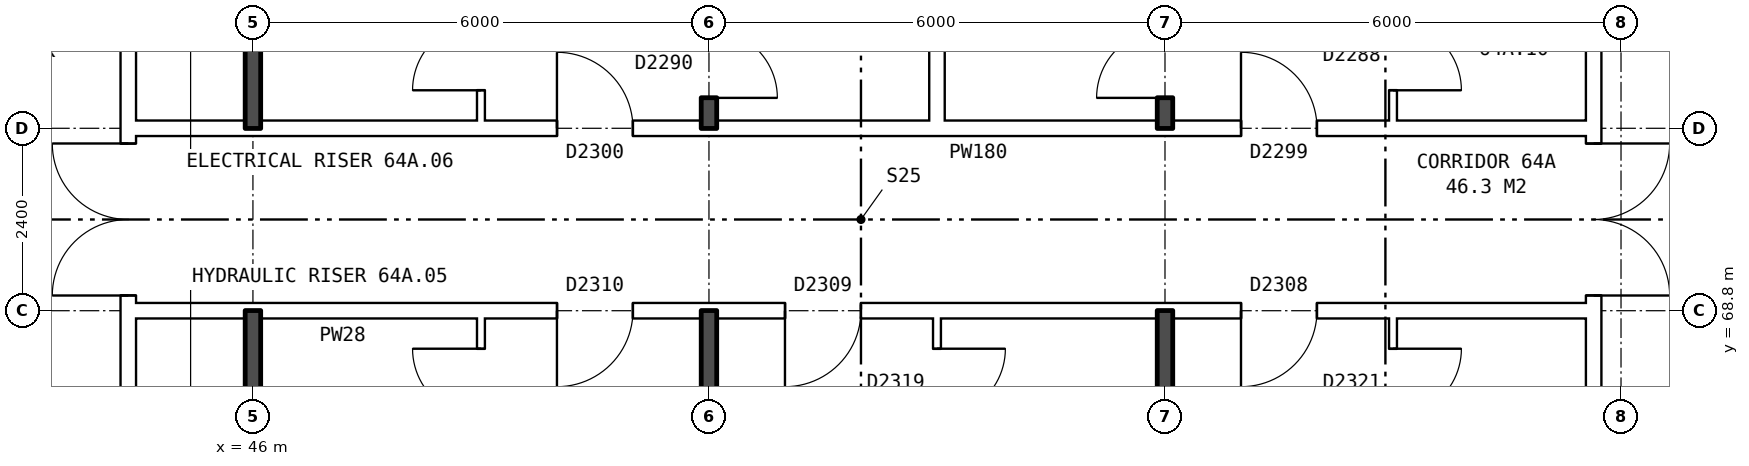
"""IFC4 building model, lengths in metres.
Left out: names, types, materials, properties, quantities, classifications, styles, units other than length and angle.
Written with IfcOpenShell. Run it as: python <this file> out.ifc"""

import sys

from ifc_helpers import new_model, si_unit, direction, frame, frame_2d, origin, place, context, subcontext, project, spatial, rectangle, extrude, element, fill, save


model = new_model("IFC4")
c1 = context("Model", 3, precision=1e-05, world=origin(), true_north=direction((0.0, 1.0)))
c2 = subcontext(c1, "Body", "Model", "MODEL_VIEW")
j1 = project(units=[si_unit("LENGTHUNIT", "METRE"), si_unit("PLANEANGLEUNIT", "RADIAN")], contexts=[c1])
p1 = place(None, origin())
s1 = spatial("IfcSite", under=j1, at=p1, CompositionType="ELEMENT")
p2 = place(p1, origin())
s2 = spatial("IfcBuilding", under=s1, at=p2, CompositionType="ELEMENT")
p3 = place(p2, frame((0.0, 0.0, 227.6)))
s3 = spatial("IfcBuildingStorey", under=s2, at=p3, CompositionType="ELEMENT", Elevation=227.6)
p4 = place(p3, frame((63.64, 63.9, 0.0), z_axis=(0.0, 0.0, 1.0), x_axis=(0.0, 1.0, 0.0)))
e1 = element("IfcWall", 1, at=p4, inside=s3, PredefinedType="PARTITIONING", context=c2, shape_type="SweptSolid", body=[
    extrude(rectangle(XDim=12.2, YDim=0.2, at=frame_2d((6.1, 0.0))), origin(), (0.0, 0.0, 1.0), 2.85),
])
p5 = place(p4, frame((5.1, 0.0, 0.0)))
e2 = element("IfcOpeningElement", 2, at=p5, cuts=e1, PredefinedType="OPENING", context=c2, shape_type="SweptSolid", body=[
    extrude(rectangle(XDim=2.0, YDim=2.1, at=frame_2d((1.0, 1.05))), frame((0.0, 0.11, 0.0), z_axis=(0.0, -1.0, 0.0), x_axis=(1.0, 0.0, 0.0)), (0.0, 0.0, 1.0), 0.22),
])
p6 = place(p3, frame((44.36, 63.9, 0.0), z_axis=(0.0, 0.0, 1.0), x_axis=(0.0, 1.0, 0.0)))
e3 = element("IfcWall", 3, at=p6, inside=s3, PredefinedType="PARTITIONING", context=c2, shape_type="SweptSolid", body=[
    extrude(rectangle(XDim=12.2, YDim=0.2, at=frame_2d((6.1, 0.0))), origin(), (0.0, 0.0, 1.0), 2.85),
])
p7 = place(p6, frame((5.1, 0.0, 0.0)))
e4 = element("IfcOpeningElement", 4, at=p7, cuts=e3, PredefinedType="OPENING", context=c2, shape_type="SweptSolid", body=[
    extrude(rectangle(XDim=2.0, YDim=2.1, at=frame_2d((1.0, 1.05))), frame((0.0, 0.11, 0.0), z_axis=(0.0, -1.0, 0.0), x_axis=(1.0, 0.0, 0.0)), (0.0, 0.0, 1.0), 0.22),
])
p8 = place(p3, frame((44.36, 68.8, 0.0), z_axis=(0.0, 0.0, 1.0), x_axis=(1.0, 0.0, 0.0)))
e5 = element("IfcWall", 5, at=p8, inside=s3, PredefinedType="PARTITIONING", context=c2, shape_type="SweptSolid", body=[
    extrude(rectangle(XDim=19.28, YDim=0.2, at=frame_2d((9.64, 0.0))), origin(), (0.0, 0.0, 1.0), 2.85),
])
p9 = place(p8, frame((14.64, 0.0, 0.0)))
e6 = element("IfcOpeningElement", 6, at=p9, cuts=e5, PredefinedType="OPENING", context=c2, shape_type="SweptSolid", body=[
    extrude(rectangle(XDim=1.0, YDim=2.1, at=frame_2d((0.5, 1.05))), frame((0.0, 0.11, 0.0), z_axis=(0.0, -1.0, 0.0), x_axis=(1.0, 0.0, 0.0)), (0.0, 0.0, 1.0), 0.22),
])
p10 = place(p8, frame((8.64, 0.0, 0.0)))
e7 = element("IfcOpeningElement", 7, at=p10, cuts=e5, PredefinedType="OPENING", context=c2, shape_type="SweptSolid", body=[
    extrude(rectangle(XDim=1.0, YDim=2.1, at=frame_2d((0.5, 1.05))), frame((0.0, 0.11, 0.0), z_axis=(0.0, -1.0, 0.0), x_axis=(1.0, 0.0, 0.0)), (0.0, 0.0, 1.0), 0.22),
])
p11 = place(p8, frame((5.64, 0.0, 0.0)))
e8 = element("IfcOpeningElement", 8, at=p11, cuts=e5, PredefinedType="OPENING", context=c2, shape_type="SweptSolid", body=[
    extrude(rectangle(XDim=1.0, YDim=2.1, at=frame_2d((0.5, 1.05))), frame((0.0, 0.11, 0.0), z_axis=(0.0, -1.0, 0.0), x_axis=(1.0, 0.0, 0.0)), (0.0, 0.0, 1.0), 0.22),
])
p12 = place(p3, frame((44.36, 71.2, 0.0), z_axis=(0.0, 0.0, 1.0), x_axis=(1.0, 0.0, 0.0)))
e9 = element("IfcWall", 9, at=p12, inside=s3, PredefinedType="PARTITIONING", context=c2, shape_type="SweptSolid", body=[
    extrude(rectangle(XDim=19.28, YDim=0.2, at=frame_2d((9.64, 0.0))), origin(), (0.0, 0.0, 1.0), 2.85),
])
p13 = place(p12, frame((14.64, 0.0, 0.0)))
e10 = element("IfcOpeningElement", 10, at=p13, cuts=e9, PredefinedType="OPENING", context=c2, shape_type="SweptSolid", body=[
    extrude(rectangle(XDim=1.0, YDim=2.1, at=frame_2d((0.5, 1.05))), frame((0.0, 0.11, 0.0), z_axis=(0.0, -1.0, 0.0), x_axis=(1.0, 0.0, 0.0)), (0.0, 0.0, 1.0), 0.22),
])
p14 = place(p12, frame((5.64, 0.0, 0.0)))
e11 = element("IfcOpeningElement", 11, at=p14, cuts=e9, PredefinedType="OPENING", context=c2, shape_type="SweptSolid", body=[
    extrude(rectangle(XDim=1.0, YDim=2.1, at=frame_2d((0.5, 1.05))), frame((0.0, 0.11, 0.0), z_axis=(0.0, -1.0, 0.0), x_axis=(1.0, 0.0, 0.0)), (0.0, 0.0, 1.0), 0.22),
])
for number, where, z_axis, x_axis in (
    (12, (46.0, 54.36, 0.0), (0.0, 0.0, 1.0), (0.0, 1.0, 0.0)),
    (13, (46.0, 71.2, 0.0), (0.0, 0.0, 1.0), (0.0, 1.0, 0.0)),
):
    element("IfcWall", number, at=place(p3, frame(where, z_axis=z_axis, x_axis=x_axis)), inside=s3, PredefinedType="SOLIDWALL", context=c2, shape_type="SweptSolid", body=[
        extrude(rectangle(XDim=14.44, YDim=0.2, at=frame_2d((7.22, 0.0))), origin(), (0.0, 0.0, 1.0), 2.85),
    ])
p15 = place(p3, frame((49.0, 54.36, 0.0), z_axis=(0.0, 0.0, 1.0), x_axis=(0.0, 1.0, 0.0)))
e14 = element("IfcWall", 14, at=p15, inside=s3, PredefinedType="PARTITIONING", context=c2, shape_type="SweptSolid", body=[
    extrude(rectangle(XDim=14.34, YDim=0.1, at=frame_2d((7.17, 0.0))), origin(), (0.0, 0.0, 1.0), 2.85),
])
p16 = place(p15, frame((7.7, 0.0, 0.0)))
e15 = element("IfcOpeningElement", 15, at=p16, cuts=e14, PredefinedType="OPENING", context=c2, shape_type="SweptSolid", body=[
    extrude(rectangle(XDim=0.9, YDim=2.1, at=frame_2d((0.45, 1.05))), frame((0.0, 0.06, 0.0), z_axis=(0.0, -1.0, 0.0), x_axis=(1.0, 0.0, 0.0)), (0.0, 0.0, 1.0), 0.12),
])
p17 = place(p15, frame((13.04, 0.0, 0.0)))
e16 = element("IfcOpeningElement", 16, at=p17, cuts=e14, PredefinedType="OPENING", context=c2, shape_type="SweptSolid", body=[
    extrude(rectangle(XDim=0.9, YDim=2.1, at=frame_2d((0.45, 1.05))), frame((0.0, 0.06, 0.0), z_axis=(0.0, -1.0, 0.0), x_axis=(1.0, 0.0, 0.0)), (0.0, 0.0, 1.0), 0.12),
])
p18 = place(p3, frame((49.0, 71.3, 0.0), z_axis=(0.0, 0.0, 1.0), x_axis=(0.0, 1.0, 0.0)))
e17 = element("IfcWall", 17, at=p18, inside=s3, PredefinedType="PARTITIONING", context=c2, shape_type="SweptSolid", body=[
    extrude(rectangle(XDim=14.34, YDim=0.1, at=frame_2d((7.17, 0.0))), origin(), (0.0, 0.0, 1.0), 2.85),
])
p19 = place(p18, frame((5.74, 0.0, 0.0)))
e18 = element("IfcOpeningElement", 18, at=p19, cuts=e17, PredefinedType="OPENING", context=c2, shape_type="SweptSolid", body=[
    extrude(rectangle(XDim=0.9, YDim=2.1, at=frame_2d((0.45, 1.05))), frame((0.0, 0.06, 0.0), z_axis=(0.0, -1.0, 0.0), x_axis=(1.0, 0.0, 0.0)), (0.0, 0.0, 1.0), 0.12),
])
p20 = place(p18, frame((0.4, 0.0, 0.0)))
e19 = element("IfcOpeningElement", 19, at=p20, cuts=e17, PredefinedType="OPENING", context=c2, shape_type="SweptSolid", body=[
    extrude(rectangle(XDim=0.9, YDim=2.1, at=frame_2d((0.45, 1.05))), frame((0.0, 0.06, 0.0), z_axis=(0.0, -1.0, 0.0), x_axis=(1.0, 0.0, 0.0)), (0.0, 0.0, 1.0), 0.12),
])
p21 = place(p3, frame((52.0, 54.36, 0.0), z_axis=(0.0, 0.0, 1.0), x_axis=(0.0, 1.0, 0.0)))
e20 = element("IfcWall", 20, at=p21, inside=s3, PredefinedType="SOLIDWALL", context=c2, shape_type="SweptSolid", body=[
    extrude(rectangle(XDim=14.44, YDim=0.2, at=frame_2d((7.22, 0.0))), origin(), (0.0, 0.0, 1.0), 2.85),
])
p22 = place(p3, frame((52.0, 71.2, 0.0), z_axis=(0.0, 0.0, 1.0), x_axis=(0.0, 1.0, 0.0)))
e21 = element("IfcWall", 21, at=p22, inside=s3, PredefinedType="SOLIDWALL", context=c2, shape_type="SweptSolid", body=[
    extrude(rectangle(XDim=14.44, YDim=0.2, at=frame_2d((7.22, 0.0))), origin(), (0.0, 0.0, 1.0), 2.85),
])
p23 = place(p22, frame((5.84, 0.0, 0.0)))
e22 = element("IfcOpeningElement", 22, at=p23, cuts=e21, PredefinedType="OPENING", context=c2, shape_type="SweptSolid", body=[
    extrude(rectangle(XDim=0.9, YDim=2.1, at=frame_2d((0.45, 1.05))), frame((0.0, 0.11, 0.0), z_axis=(0.0, -1.0, 0.0), x_axis=(1.0, 0.0, 0.0)), (0.0, 0.0, 1.0), 0.22),
])
p24 = place(p22, frame((0.4, 0.0, 0.0)))
e23 = element("IfcOpeningElement", 23, at=p24, cuts=e21, PredefinedType="OPENING", context=c2, shape_type="SweptSolid", body=[
    extrude(rectangle(XDim=0.9, YDim=2.1, at=frame_2d((0.45, 1.05))), frame((0.0, 0.11, 0.0), z_axis=(0.0, -1.0, 0.0), x_axis=(1.0, 0.0, 0.0)), (0.0, 0.0, 1.0), 0.22),
])
p25 = place(p3, frame((55.0, 54.36, 0.0), z_axis=(0.0, 0.0, 1.0), x_axis=(0.0, 1.0, 0.0)))
e24 = element("IfcWall", 24, at=p25, inside=s3, PredefinedType="PARTITIONING", context=c2, shape_type="SweptSolid", body=[
    extrude(rectangle(XDim=14.34, YDim=0.1, at=frame_2d((7.17, 0.0))), origin(), (0.0, 0.0, 1.0), 2.85),
])
p26 = place(p25, frame((4.2, 0.0, 0.0)))
e25 = element("IfcOpeningElement", 25, at=p26, cuts=e24, PredefinedType="OPENING", context=c2, shape_type="SweptSolid", body=[
    extrude(rectangle(XDim=0.9, YDim=2.1, at=frame_2d((0.45, 1.05))), frame((0.0, 0.06, 0.0), z_axis=(0.0, -1.0, 0.0), x_axis=(1.0, 0.0, 0.0)), (0.0, 0.0, 1.0), 0.12),
])
p27 = place(p25, frame((13.04, 0.0, 0.0)))
e26 = element("IfcOpeningElement", 26, at=p27, cuts=e24, PredefinedType="OPENING", context=c2, shape_type="SweptSolid", body=[
    extrude(rectangle(XDim=0.9, YDim=2.1, at=frame_2d((0.45, 1.05))), frame((0.0, 0.06, 0.0), z_axis=(0.0, -1.0, 0.0), x_axis=(1.0, 0.0, 0.0)), (0.0, 0.0, 1.0), 0.12),
])
p28 = place(p3, frame((55.0, 71.3, 0.0), z_axis=(0.0, 0.0, 1.0), x_axis=(0.0, 1.0, 0.0)))
e27 = element("IfcWall", 27, at=p28, inside=s3, PredefinedType="PARTITIONING", context=c2, shape_type="SweptSolid", body=[
    extrude(rectangle(XDim=14.34, YDim=0.2, at=frame_2d((7.17, 0.0))), origin(), (0.0, 0.0, 1.0), 2.85),
])
p29 = place(p3, frame((58.0, 54.36, 0.0), z_axis=(0.0, 0.0, 1.0), x_axis=(0.0, 1.0, 0.0)))
e28 = element("IfcWall", 28, at=p29, inside=s3, PredefinedType="SOLIDWALL", context=c2, shape_type="SweptSolid", body=[
    extrude(rectangle(XDim=14.44, YDim=0.2, at=frame_2d((7.22, 0.0))), origin(), (0.0, 0.0, 1.0), 2.85),
])
p30 = place(p3, frame((58.0, 71.2, 0.0), z_axis=(0.0, 0.0, 1.0), x_axis=(0.0, 1.0, 0.0)))
e29 = element("IfcWall", 29, at=p30, inside=s3, PredefinedType="SOLIDWALL", context=c2, shape_type="SweptSolid", body=[
    extrude(rectangle(XDim=14.44, YDim=0.2, at=frame_2d((7.22, 0.0))), origin(), (0.0, 0.0, 1.0), 2.85),
])
p31 = place(p30, frame((8.04, 0.0, 0.0)))
e30 = element("IfcOpeningElement", 30, at=p31, cuts=e29, PredefinedType="OPENING", context=c2, shape_type="SweptSolid", body=[
    extrude(rectangle(XDim=0.9, YDim=2.1, at=frame_2d((0.45, 1.05))), frame((0.0, 0.11, 0.0), z_axis=(0.0, -1.0, 0.0), x_axis=(1.0, 0.0, 0.0)), (0.0, 0.0, 1.0), 0.22),
])
p32 = place(p30, frame((0.4, 0.0, 0.0)))
e31 = element("IfcOpeningElement", 31, at=p32, cuts=e29, PredefinedType="OPENING", context=c2, shape_type="SweptSolid", body=[
    extrude(rectangle(XDim=0.9, YDim=2.1, at=frame_2d((0.45, 1.05))), frame((0.0, 0.11, 0.0), z_axis=(0.0, -1.0, 0.0), x_axis=(1.0, 0.0, 0.0)), (0.0, 0.0, 1.0), 0.22),
])
p33 = place(p3, frame((61.0, 54.36, 0.0), z_axis=(0.0, 0.0, 1.0), x_axis=(0.0, 1.0, 0.0)))
e32 = element("IfcWall", 32, at=p33, inside=s3, PredefinedType="PARTITIONING", context=c2, shape_type="SweptSolid", body=[
    extrude(rectangle(XDim=14.34, YDim=0.1, at=frame_2d((7.17, 0.0))), origin(), (0.0, 0.0, 1.0), 2.85),
])
p34 = place(p33, frame((7.7, 0.0, 0.0)))
e33 = element("IfcOpeningElement", 33, at=p34, cuts=e32, PredefinedType="OPENING", context=c2, shape_type="SweptSolid", body=[
    extrude(rectangle(XDim=0.9, YDim=2.1, at=frame_2d((0.45, 1.05))), frame((0.0, 0.06, 0.0), z_axis=(0.0, -1.0, 0.0), x_axis=(1.0, 0.0, 0.0)), (0.0, 0.0, 1.0), 0.12),
])
p35 = place(p33, frame((13.04, 0.0, 0.0)))
e34 = element("IfcOpeningElement", 34, at=p35, cuts=e32, PredefinedType="OPENING", context=c2, shape_type="SweptSolid", body=[
    extrude(rectangle(XDim=0.9, YDim=2.1, at=frame_2d((0.45, 1.05))), frame((0.0, 0.06, 0.0), z_axis=(0.0, -1.0, 0.0), x_axis=(1.0, 0.0, 0.0)), (0.0, 0.0, 1.0), 0.12),
])
p36 = place(p3, frame((61.0, 71.3, 0.0), z_axis=(0.0, 0.0, 1.0), x_axis=(0.0, 1.0, 0.0)))
e35 = element("IfcWall", 35, at=p36, inside=s3, PredefinedType="PARTITIONING", context=c2, shape_type="SweptSolid", body=[
    extrude(rectangle(XDim=14.34, YDim=0.1, at=frame_2d((7.17, 0.0))), origin(), (0.0, 0.0, 1.0), 2.85),
])
p37 = place(p36, frame((7.94, 0.0, 0.0)))
e36 = element("IfcOpeningElement", 36, at=p37, cuts=e35, PredefinedType="OPENING", context=c2, shape_type="SweptSolid", body=[
    extrude(rectangle(XDim=0.9, YDim=2.1, at=frame_2d((0.45, 1.05))), frame((0.0, 0.06, 0.0), z_axis=(0.0, -1.0, 0.0), x_axis=(1.0, 0.0, 0.0)), (0.0, 0.0, 1.0), 0.12),
])
p38 = place(p36, frame((0.4, 0.0, 0.0)))
e37 = element("IfcOpeningElement", 37, at=p38, cuts=e35, PredefinedType="OPENING", context=c2, shape_type="SweptSolid", body=[
    extrude(rectangle(XDim=0.9, YDim=2.1, at=frame_2d((0.45, 1.05))), frame((0.0, 0.06, 0.0), z_axis=(0.0, -1.0, 0.0), x_axis=(1.0, 0.0, 0.0)), (0.0, 0.0, 1.0), 0.12),
])
p39 = place(p5, frame((2.0, 0.0, 0.0), z_axis=(0.0, 0.0, 1.0), x_axis=(-1.0, 0.0, 0.0)))
e38 = element("IfcDoor", 38, at=p39, inside=s3, OperationType="DOUBLE_DOOR_SINGLE_SWING", PredefinedType="DOOR", context=c2, shape_type="SweptSolid", body=[
    extrude(rectangle(XDim=2.0, YDim=2.1, at=frame_2d((1.0, 1.05))), frame((0.0, 0.025, 0.0), z_axis=(0.0, -1.0, 0.0), x_axis=(1.0, 0.0, 0.0)), (0.0, 0.0, 1.0), 0.05),
])
fill(e2, e38)
p40 = place(p7, origin())
e39 = element("IfcDoor", 39, at=p40, inside=s3, OperationType="DOUBLE_DOOR_SINGLE_SWING", PredefinedType="DOOR", context=c2, shape_type="SweptSolid", body=[
    extrude(rectangle(XDim=2.0, YDim=2.1, at=frame_2d((1.0, 1.05))), frame((0.0, 0.025, 0.0), z_axis=(0.0, -1.0, 0.0), x_axis=(1.0, 0.0, 0.0)), (0.0, 0.0, 1.0), 0.05),
])
fill(e4, e39)
p41 = place(p9, frame((1.0, 0.0, 0.0), z_axis=(0.0, 0.0, 1.0), x_axis=(-1.0, 0.0, 0.0)))
e40 = element("IfcDoor", 40, at=p41, inside=s3, OperationType="SINGLE_SWING_RIGHT", PredefinedType="DOOR", context=c2, shape_type="SweptSolid", body=[
    extrude(rectangle(XDim=1.0, YDim=2.1, at=frame_2d((0.5, 1.05))), frame((0.0, 0.025, 0.0), z_axis=(0.0, -1.0, 0.0), x_axis=(1.0, 0.0, 0.0)), (0.0, 0.0, 1.0), 0.05),
])
fill(e6, e40)
p42 = place(p35, frame((0.9, 0.0, 0.0), z_axis=(0.0, 0.0, 1.0), x_axis=(-1.0, 0.0, 0.0)))
e41 = element("IfcDoor", 41, at=p42, inside=s3, OperationType="SINGLE_SWING_LEFT", PredefinedType="DOOR", context=c2, shape_type="SweptSolid", body=[
    extrude(rectangle(XDim=0.9, YDim=2.1, at=frame_2d((0.45, 1.05))), frame((0.0, 0.025, 0.0), z_axis=(0.0, -1.0, 0.0), x_axis=(1.0, 0.0, 0.0)), (0.0, 0.0, 1.0), 0.05),
])
fill(e34, e41)
p43 = place(p10, frame((1.0, 0.0, 0.0), z_axis=(0.0, 0.0, 1.0), x_axis=(-1.0, 0.0, 0.0)))
e42 = element("IfcDoor", 42, at=p43, inside=s3, OperationType="SINGLE_SWING_RIGHT", PredefinedType="DOOR", context=c2, shape_type="SweptSolid", body=[
    extrude(rectangle(XDim=1.0, YDim=2.1, at=frame_2d((0.5, 1.05))), frame((0.0, 0.025, 0.0), z_axis=(0.0, -1.0, 0.0), x_axis=(1.0, 0.0, 0.0)), (0.0, 0.0, 1.0), 0.05),
])
fill(e7, e42)
p44 = place(p27, frame((0.9, 0.0, 0.0), z_axis=(0.0, 0.0, 1.0), x_axis=(-1.0, 0.0, 0.0)))
e43 = element("IfcDoor", 43, at=p44, inside=s3, OperationType="SINGLE_SWING_LEFT", PredefinedType="DOOR", context=c2, shape_type="SweptSolid", body=[
    extrude(rectangle(XDim=0.9, YDim=2.1, at=frame_2d((0.45, 1.05))), frame((0.0, 0.025, 0.0), z_axis=(0.0, -1.0, 0.0), x_axis=(1.0, 0.0, 0.0)), (0.0, 0.0, 1.0), 0.05),
])
fill(e26, e43)
p45 = place(p11, frame((1.0, 0.0, 0.0), z_axis=(0.0, 0.0, 1.0), x_axis=(-1.0, 0.0, 0.0)))
e44 = element("IfcDoor", 44, at=p45, inside=s3, OperationType="SINGLE_SWING_RIGHT", PredefinedType="DOOR", context=c2, shape_type="SweptSolid", body=[
    extrude(rectangle(XDim=1.0, YDim=2.1, at=frame_2d((0.5, 1.05))), frame((0.0, 0.025, 0.0), z_axis=(0.0, -1.0, 0.0), x_axis=(1.0, 0.0, 0.0)), (0.0, 0.0, 1.0), 0.05),
])
fill(e8, e44)
p46 = place(p17, origin())
e45 = element("IfcDoor", 45, at=p46, inside=s3, OperationType="SINGLE_SWING_RIGHT", PredefinedType="DOOR", context=c2, shape_type="SweptSolid", body=[
    extrude(rectangle(XDim=0.9, YDim=2.1, at=frame_2d((0.45, 1.05))), frame((0.0, 0.025, 0.0), z_axis=(0.0, -1.0, 0.0), x_axis=(1.0, 0.0, 0.0)), (0.0, 0.0, 1.0), 0.05),
])
fill(e16, e45)
p47 = place(p13, origin())
e46 = element("IfcDoor", 46, at=p47, inside=s3, OperationType="SINGLE_SWING_LEFT", PredefinedType="DOOR", context=c2, shape_type="SweptSolid", body=[
    extrude(rectangle(XDim=1.0, YDim=2.1, at=frame_2d((0.5, 1.05))), frame((0.0, 0.025, 0.0), z_axis=(0.0, -1.0, 0.0), x_axis=(1.0, 0.0, 0.0)), (0.0, 0.0, 1.0), 0.05),
])
fill(e10, e46)
p48 = place(p38, frame((0.9, 0.0, 0.0), z_axis=(0.0, 0.0, 1.0), x_axis=(-1.0, 0.0, 0.0)))
e47 = element("IfcDoor", 47, at=p48, inside=s3, OperationType="SINGLE_SWING_RIGHT", PredefinedType="DOOR", context=c2, shape_type="SweptSolid", body=[
    extrude(rectangle(XDim=0.9, YDim=2.1, at=frame_2d((0.45, 1.05))), frame((0.0, 0.025, 0.0), z_axis=(0.0, -1.0, 0.0), x_axis=(1.0, 0.0, 0.0)), (0.0, 0.0, 1.0), 0.05),
])
fill(e37, e47)
p49 = place(p32, origin())
e48 = element("IfcDoor", 48, at=p49, inside=s3, OperationType="SINGLE_SWING_LEFT", PredefinedType="DOOR", context=c2, shape_type="SweptSolid", body=[
    extrude(rectangle(XDim=0.9, YDim=2.1, at=frame_2d((0.45, 1.05))), frame((0.0, 0.025, 0.0), z_axis=(0.0, -1.0, 0.0), x_axis=(1.0, 0.0, 0.0)), (0.0, 0.0, 1.0), 0.05),
])
fill(e31, e48)
p50 = place(p14, origin())
e49 = element("IfcDoor", 49, at=p50, inside=s3, OperationType="SINGLE_SWING_LEFT", PredefinedType="DOOR", context=c2, shape_type="SweptSolid", body=[
    extrude(rectangle(XDim=1.0, YDim=2.1, at=frame_2d((0.5, 1.05))), frame((0.0, 0.025, 0.0), z_axis=(0.0, -1.0, 0.0), x_axis=(1.0, 0.0, 0.0)), (0.0, 0.0, 1.0), 0.05),
])
fill(e11, e49)
p51 = place(p24, frame((0.9, 0.0, 0.0), z_axis=(0.0, 0.0, 1.0), x_axis=(-1.0, 0.0, 0.0)))
e50 = element("IfcDoor", 50, at=p51, inside=s3, OperationType="SINGLE_SWING_RIGHT", PredefinedType="DOOR", context=c2, shape_type="SweptSolid", body=[
    extrude(rectangle(XDim=0.9, YDim=2.1, at=frame_2d((0.45, 1.05))), frame((0.0, 0.025, 0.0), z_axis=(0.0, -1.0, 0.0), x_axis=(1.0, 0.0, 0.0)), (0.0, 0.0, 1.0), 0.05),
])
fill(e23, e50)
p52 = place(p20, origin())
e51 = element("IfcDoor", 51, at=p52, inside=s3, OperationType="SINGLE_SWING_LEFT", PredefinedType="DOOR", context=c2, shape_type="SweptSolid", body=[
    extrude(rectangle(XDim=0.9, YDim=2.1, at=frame_2d((0.45, 1.05))), frame((0.0, 0.025, 0.0), z_axis=(0.0, -1.0, 0.0), x_axis=(1.0, 0.0, 0.0)), (0.0, 0.0, 1.0), 0.05),
])
fill(e19, e51)
save(model, sys.argv[1])
